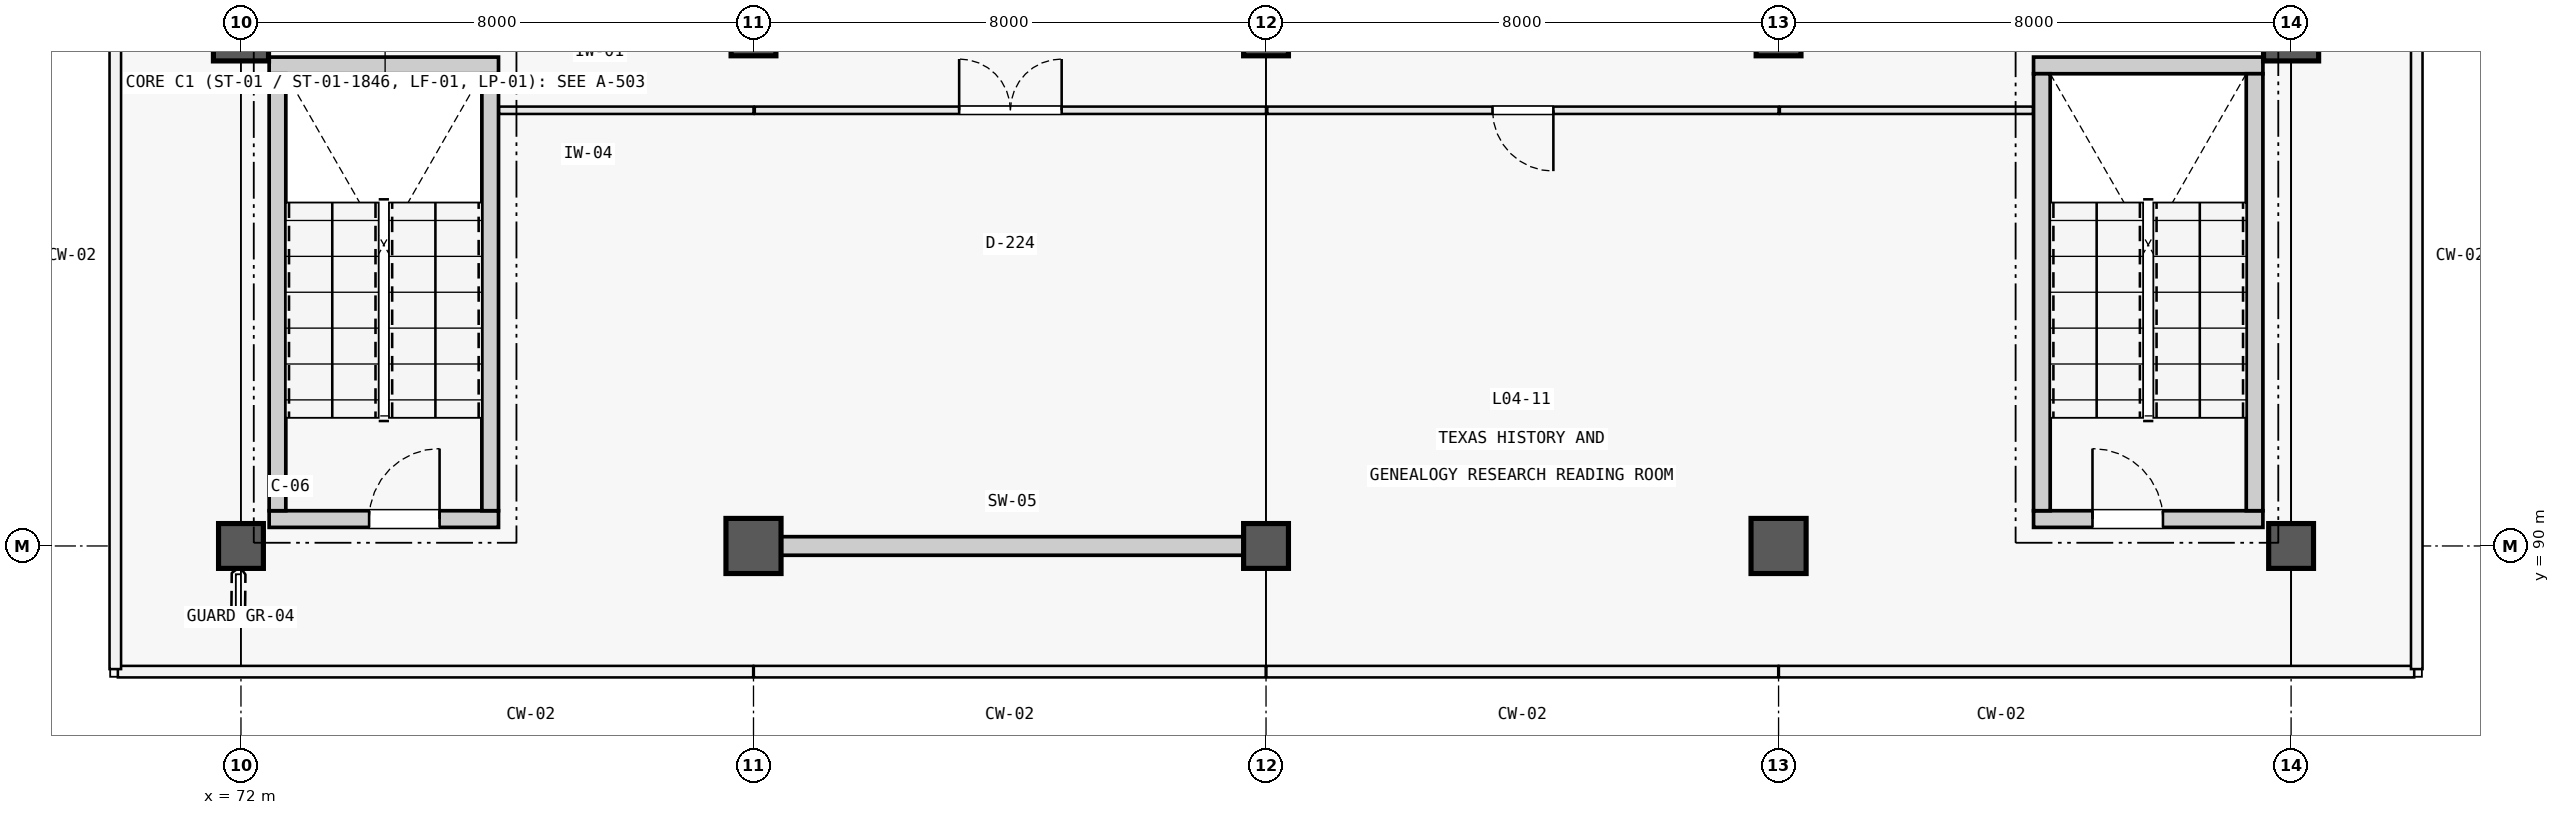
"""IFC4 building model, lengths in metres.
Left out: names, types, materials, properties, quantities, classifications, styles, units other than length and angle.
Written with IfcOpenShell. Run it as: python <this file> out.ifc"""

import sys

from ifc_helpers import new_model, si_unit, direction, frame, frame_2d, origin, origin_2d, place, context, subcontext, project, spatial, rectangle, extrude, element, fill, save


model = new_model("IFC4")
c1 = context("Model", 3, precision=1e-05, world=origin(), true_north=direction((0.0, 1.0)))
c2 = subcontext(c1, "Body", "Model", "MODEL_VIEW")
j1 = project(units=[si_unit("LENGTHUNIT", "METRE"), si_unit("PLANEANGLEUNIT", "RADIAN")], contexts=[c1])
p1 = place(None, origin())
s1 = spatial("IfcSite", under=j1, at=p1, CompositionType="ELEMENT")
p2 = place(p1, origin())
s2 = spatial("IfcBuilding", under=s1, at=p2, CompositionType="ELEMENT")
p3 = place(p2, frame((0.0, 0.0, 15.3)))
s3 = spatial("IfcBuildingStorey", under=s2, at=p3, CompositionType="ELEMENT", Elevation=15.3)
p4 = place(p3, frame((72.0, 90.0, 0.0), z_axis=(0.0, 0.0, 1.0), x_axis=(1.0, 0.0, 0.0)))
e1 = element("IfcColumn", 1, at=p4, inside=s3, PredefinedType="COLUMN", context=c2, shape_type="SweptSolid", body=[
    extrude(rectangle(XDim=0.7, YDim=0.7, at=origin_2d()), origin(), (0.0, 0.0, 1.0), 4.8),
])
for number, where, z_axis, x_axis in (
    (2, (72.0, 98.0, 0.0), (0.0, 0.0, 1.0), (1.0, 0.0, 0.0)),
    (3, (80.0, 90.0, 0.0), (0.0, 0.0, 1.0), (1.0, 0.0, 0.0)),
):
    element("IfcColumn", number, at=place(p3, frame(where, z_axis=z_axis, x_axis=x_axis)), inside=s3, PredefinedType="COLUMN", context=c2, shape_type="SweptSolid", body=[
        extrude(rectangle(XDim=0.86, YDim=0.86, at=origin_2d()), origin(), (0.0, 0.0, 1.0), 4.8),
    ])
for number, where, z_axis, x_axis in (
    (4, (80.0, 98.0, 0.0), (0.0, 0.0, 1.0), (1.0, 0.0, 0.0)),
    (5, (88.0, 90.0, 0.0), (0.0, 0.0, 1.0), (1.0, 0.0, 0.0)),
    (6, (88.0, 98.0, 0.0), (0.0, 0.0, 1.0), (1.0, 0.0, 0.0)),
):
    element("IfcColumn", number, at=place(p3, frame(where, z_axis=z_axis, x_axis=x_axis)), inside=s3, PredefinedType="COLUMN", context=c2, shape_type="SweptSolid", body=[
        extrude(rectangle(XDim=0.7, YDim=0.7, at=origin_2d()), origin(), (0.0, 0.0, 1.0), 4.8),
    ])
p5 = place(p3, frame((96.0, 90.0, 0.0), z_axis=(0.0, 0.0, 1.0), x_axis=(1.0, 0.0, 0.0)))
e7 = element("IfcColumn", 7, at=p5, inside=s3, PredefinedType="COLUMN", context=c2, shape_type="SweptSolid", body=[
    extrude(rectangle(XDim=0.86, YDim=0.86, at=origin_2d()), origin(), (0.0, 0.0, 1.0), 4.8),
])
for number, where, z_axis, x_axis in (
    (8, (96.0, 98.0, 0.0), (0.0, 0.0, 1.0), (1.0, 0.0, 0.0)),
    (9, (104.0, 90.0, 0.0), (0.0, 0.0, 1.0), (1.0, 0.0, 0.0)),
):
    element("IfcColumn", number, at=place(p3, frame(where, z_axis=z_axis, x_axis=x_axis)), inside=s3, PredefinedType="COLUMN", context=c2, shape_type="SweptSolid", body=[
        extrude(rectangle(XDim=0.7, YDim=0.7, at=origin_2d()), origin(), (0.0, 0.0, 1.0), 4.8),
    ])
p6 = place(p3, frame((104.0, 98.0, 0.0), z_axis=(0.0, 0.0, 1.0), x_axis=(1.0, 0.0, 0.0)))
e10 = element("IfcColumn", 10, at=p6, inside=s3, PredefinedType="COLUMN", context=c2, shape_type="SweptSolid", body=[
    extrude(rectangle(XDim=0.86, YDim=0.86, at=origin_2d()), origin(), (0.0, 0.0, 1.0), 4.8),
])
p7 = place(p3, frame((80.43, 90.0, 0.0), z_axis=(0.0, 0.0, 1.0), x_axis=(1.0, 0.0, 0.0)))
e11 = element("IfcWall", 11, at=p7, inside=s3, PredefinedType="SHEAR", context=c2, shape_type="SweptSolid", body=[
    extrude(rectangle(XDim=7.22, YDim=0.29, at=frame_2d((3.61, 0.0))), origin(), (0.0, 0.0, 1.0), 4.52),
])
p8 = place(p3, frame((72.44, 90.42, 0.0), z_axis=(0.0, 0.0, 1.0), x_axis=(1.0, 0.0, 0.0)))
e12 = element("IfcWall", 12, at=p8, inside=s3, PredefinedType="SOLIDWALL", context=c2, shape_type="SweptSolid", body=[
    extrude(rectangle(XDim=3.58, YDim=0.26, at=frame_2d((1.79, 0.0))), origin(), (0.0, 0.0, 1.0), 4.8),
])
p9 = place(p8, frame((1.56, 0.0, 0.0)))
e13 = element("IfcOpeningElement", 13, at=p9, cuts=e12, PredefinedType="OPENING", context=c2, shape_type="SweptSolid", body=[
    extrude(rectangle(XDim=1.1, YDim=2.2, at=frame_2d((0.55, 1.1))), frame((0.0, 0.142, 0.0), z_axis=(0.0, -1.0, 0.0), x_axis=(1.0, 0.0, 0.0)), (0.0, 0.0, 1.0), 0.284),
])
p10 = place(p3, frame((72.44, 97.5, 0.0), z_axis=(0.0, 0.0, 1.0), x_axis=(1.0, 0.0, 0.0)))
e14 = element("IfcWall", 14, at=p10, inside=s3, PredefinedType="SOLIDWALL", context=c2, shape_type="SweptSolid", body=[
    extrude(rectangle(XDim=3.58, YDim=0.26, at=frame_2d((1.79, 0.0))), origin(), (0.0, 0.0, 1.0), 4.8),
])
for number, where, z_axis, x_axis in (
    (15, (72.57, 90.55, 0.0), (0.0, 0.0, 1.0), (0.0, 1.0, 0.0)),
    (16, (75.89, 90.55, 0.0), (0.0, 0.0, 1.0), (0.0, 1.0, 0.0)),
):
    element("IfcWall", number, at=place(p3, frame(where, z_axis=z_axis, x_axis=x_axis)), inside=s3, PredefinedType="SOLIDWALL", context=c2, shape_type="SweptSolid", body=[
        extrude(rectangle(XDim=6.82, YDim=0.26, at=frame_2d((3.41, 0.0))), origin(), (0.0, 0.0, 1.0), 4.8),
    ])
p11 = place(p3, frame((99.98, 90.42, 0.0), z_axis=(0.0, 0.0, 1.0), x_axis=(1.0, 0.0, 0.0)))
e17 = element("IfcWall", 17, at=p11, inside=s3, PredefinedType="SOLIDWALL", context=c2, shape_type="SweptSolid", body=[
    extrude(rectangle(XDim=3.58, YDim=0.26, at=frame_2d((1.79, 0.0))), origin(), (0.0, 0.0, 1.0), 4.8),
])
p12 = place(p11, frame((0.92, 0.0, 0.0)))
e18 = element("IfcOpeningElement", 18, at=p12, cuts=e17, PredefinedType="OPENING", context=c2, shape_type="SweptSolid", body=[
    extrude(rectangle(XDim=1.1, YDim=2.2, at=frame_2d((0.55, 1.1))), frame((0.0, 0.142, 0.0), z_axis=(0.0, -1.0, 0.0), x_axis=(1.0, 0.0, 0.0)), (0.0, 0.0, 1.0), 0.284),
])
p13 = place(p3, frame((99.98, 97.5, 0.0), z_axis=(0.0, 0.0, 1.0), x_axis=(1.0, 0.0, 0.0)))
e19 = element("IfcWall", 19, at=p13, inside=s3, PredefinedType="SOLIDWALL", context=c2, shape_type="SweptSolid", body=[
    extrude(rectangle(XDim=3.58, YDim=0.26, at=frame_2d((1.79, 0.0))), origin(), (0.0, 0.0, 1.0), 4.8),
])
for number, where, z_axis, x_axis in (
    (20, (100.11, 90.55, 0.0), (0.0, 0.0, 1.0), (0.0, 1.0, 0.0)),
    (21, (103.43, 90.55, 0.0), (0.0, 0.0, 1.0), (0.0, 1.0, 0.0)),
):
    element("IfcWall", number, at=place(p3, frame(where, z_axis=z_axis, x_axis=x_axis)), inside=s3, PredefinedType="SOLIDWALL", context=c2, shape_type="SweptSolid", body=[
        extrude(rectangle(XDim=6.82, YDim=0.26, at=frame_2d((3.41, 0.0))), origin(), (0.0, 0.0, 1.0), 4.8),
    ])
p14 = place(p3, frame((76.03, 96.8, 0.0), z_axis=(0.0, 0.0, 1.0), x_axis=(1.0, 0.0, 0.0)))
e22 = element("IfcWall", 22, at=p14, inside=s3, PredefinedType="PARTITIONING", context=c2, shape_type="SweptSolid", body=[
    extrude(rectangle(XDim=3.97, YDim=0.115, at=frame_2d((1.985, 0.0))), origin(), (0.0, 0.0, 1.0), 3.37),
])
p15 = place(p3, frame((80.02, 96.8, 0.0), z_axis=(0.0, 0.0, 1.0), x_axis=(1.0, 0.0, 0.0)))
e23 = element("IfcWall", 23, at=p15, inside=s3, PredefinedType="PARTITIONING", context=c2, shape_type="SweptSolid", body=[
    extrude(rectangle(XDim=7.98, YDim=0.115, at=frame_2d((3.99, 0.0))), origin(), (0.0, 0.0, 1.0), 3.37),
])
p16 = place(p15, frame((3.19, 0.0, 0.0)))
e24 = element("IfcOpeningElement", 24, at=p16, cuts=e23, PredefinedType="OPENING", context=c2, shape_type="SweptSolid", body=[
    extrude(rectangle(XDim=1.6, YDim=2.2, at=frame_2d((0.8, 1.1))), frame((0.0, 0.069, 0.0), z_axis=(0.0, -1.0, 0.0), x_axis=(1.0, 0.0, 0.0)), (0.0, 0.0, 1.0), 0.139),
])
p17 = place(p3, frame((88.02, 96.8, 0.0), z_axis=(0.0, 0.0, 1.0), x_axis=(1.0, 0.0, 0.0)))
e25 = element("IfcWall", 25, at=p17, inside=s3, PredefinedType="PARTITIONING", context=c2, shape_type="SweptSolid", body=[
    extrude(rectangle(XDim=7.98, YDim=0.115, at=frame_2d((3.99, 0.0))), origin(), (0.0, 0.0, 1.0), 3.37),
])
p18 = place(p17, frame((3.515, 0.0, 0.0)))
e26 = element("IfcOpeningElement", 26, at=p18, cuts=e25, PredefinedType="OPENING", context=c2, shape_type="SweptSolid", body=[
    extrude(rectangle(XDim=0.95, YDim=2.15, at=frame_2d((0.475, 1.075))), frame((0.0, 0.069, 0.0), z_axis=(0.0, -1.0, 0.0), x_axis=(1.0, 0.0, 0.0)), (0.0, 0.0, 1.0), 0.139),
])
p19 = place(p3, frame((96.02, 96.8, 0.0), z_axis=(0.0, 0.0, 1.0), x_axis=(1.0, 0.0, 0.0)))
e27 = element("IfcWall", 27, at=p19, inside=s3, PredefinedType="PARTITIONING", context=c2, shape_type="SweptSolid", body=[
    extrude(rectangle(XDim=3.95, YDim=0.115, at=frame_2d((1.975, 0.0))), origin(), (0.0, 0.0, 1.0), 3.37),
])
p20 = place(p9, origin())
e28 = element("IfcDoor", 28, at=p20, inside=s3, OperationType="SINGLE_SWING_RIGHT", PredefinedType="DOOR", context=c2, shape_type="SweptSolid", body=[
    extrude(rectangle(XDim=1.1, YDim=2.2, at=frame_2d((0.55, 1.1))), frame((0.0, 0.025, 0.0), z_axis=(0.0, -1.0, 0.0), x_axis=(1.0, 0.0, 0.0)), (0.0, 0.0, 1.0), 0.05),
])
fill(e13, e28)
p21 = place(p12, origin())
e29 = element("IfcDoor", 29, at=p21, inside=s3, OperationType="SINGLE_SWING_LEFT", PredefinedType="DOOR", context=c2, shape_type="SweptSolid", body=[
    extrude(rectangle(XDim=1.1, YDim=2.2, at=frame_2d((0.55, 1.1))), frame((0.0, 0.025, 0.0), z_axis=(0.0, -1.0, 0.0), x_axis=(1.0, 0.0, 0.0)), (0.0, 0.0, 1.0), 0.05),
])
fill(e18, e29)
p22 = place(p16, origin())
e30 = element("IfcDoor", 30, at=p22, inside=s3, OperationType="DOUBLE_DOOR_SINGLE_SWING", PredefinedType="DOOR", context=c2, shape_type="SweptSolid", body=[
    extrude(rectangle(XDim=1.6, YDim=2.2, at=frame_2d((0.8, 1.1))), frame((0.0, 0.025, 0.0), z_axis=(0.0, -1.0, 0.0), x_axis=(1.0, 0.0, 0.0)), (0.0, 0.0, 1.0), 0.05),
])
fill(e24, e30)
p23 = place(p18, frame((0.95, 0.0, 0.0), z_axis=(0.0, 0.0, 1.0), x_axis=(-1.0, 0.0, 0.0)))
e31 = element("IfcDoor", 31, at=p23, inside=s3, OperationType="SINGLE_SWING_RIGHT", PredefinedType="DOOR", context=c2, shape_type="SweptSolid", body=[
    extrude(rectangle(XDim=0.95, YDim=2.15, at=frame_2d((0.475, 1.075))), frame((0.0, 0.025, 0.0), z_axis=(0.0, -1.0, 0.0), x_axis=(1.0, 0.0, 0.0)), (0.0, 0.0, 1.0), 0.05),
])
fill(e26, e31)
save(model, sys.argv[1])
